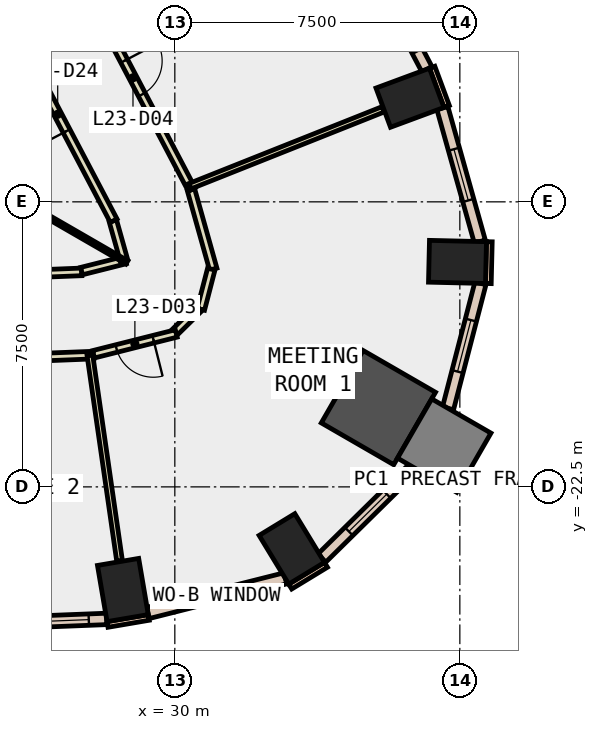
"""IFC4 building model, lengths in metres.
Left out: names, types, materials, properties, quantities, classifications, styles, units other than length and angle.
Written with IfcOpenShell. Run it as: python <this file> out.ifc"""

import sys

from ifc_helpers import new_model, si_unit, direction, frame, frame_2d, origin, origin_2d, place, context, subcontext, project, spatial, rectangle, extrude, element, fill, save


model = new_model("IFC4")
c1 = context("Model", 3, precision=1e-05, world=origin(), true_north=direction((0.0, 1.0)))
c2 = subcontext(c1, "Body", "Model", "MODEL_VIEW")
j1 = project(units=[si_unit("LENGTHUNIT", "METRE"), si_unit("PLANEANGLEUNIT", "RADIAN")], contexts=[c1])
p1 = place(None, origin())
s1 = spatial("IfcSite", under=j1, at=p1, CompositionType="ELEMENT")
p2 = place(p1, origin())
s2 = spatial("IfcBuilding", under=s1, at=p2, CompositionType="ELEMENT")
p3 = place(p2, frame((0.0, 0.0, 107.6)))
s3 = spatial("IfcBuildingStorey", under=s2, at=p3, CompositionType="ELEMENT", Elevation=107.6)
for number, where, z_axis, x_axis in (
    (1, (28.633, -25.214, -0.4), (0.0, 0.0, 1.0), (0.986, 0.168, 0.0)),
    (2, (33.078, -24.132, -0.4), (0.0, 0.0, 1.0), (0.854, 0.52, 0.0)),
):
    element("IfcColumn", number, at=place(p3, frame(where, z_axis=z_axis, x_axis=x_axis)), inside=s3, PredefinedType="COLUMN", context=c2, shape_type="SweptSolid", body=[
        extrude(rectangle(XDim=1.1, YDim=1.5, at=origin_2d()), origin(), (0.0, 0.0, 1.0), 4.2),
    ])
p4 = place(p3, frame((35.357, -20.414, -0.4), z_axis=(0.0, 0.0, 1.0), x_axis=(-0.866025403784, 0.5, 0.0)))
e3 = element("IfcColumn", 3, at=p4, inside=s3, PredefinedType="COLUMN", context=c2, shape_type="SweptSolid", body=[
    extrude(rectangle(XDim=2.2, YDim=2.2, at=origin_2d()), origin(), (0.0, 0.0, 1.0), 4.2),
])
for number, where, z_axis, x_axis in (
    (4, (37.438, -16.581, -0.4), (0.0, 0.0, 1.0), (0.023, 1.0, 0.0)),
    (5, (36.188, -12.261, -0.4), (0.0, 0.0, 1.0), (-0.347, 0.938, 0.0)),
):
    element("IfcColumn", number, at=place(p3, frame(where, z_axis=z_axis, x_axis=x_axis)), inside=s3, PredefinedType="COLUMN", context=c2, shape_type="SweptSolid", body=[
        extrude(rectangle(XDim=1.1, YDim=1.5, at=origin_2d()), origin(), (0.0, 0.0, 1.0), 4.2),
    ])
p5 = place(p3, frame((37.089, -21.414, -0.4), z_axis=(0.0, 0.0, 1.0), x_axis=(-0.866025403784, 0.5, 0.0)))
e6 = element("IfcColumn", 6, at=p5, inside=s3, PredefinedType="COLUMN", context=c2, shape_type="SweptSolid", body=[
    extrude(rectangle(XDim=1.8, YDim=1.8, at=origin_2d()), origin(), (0.0, 0.0, 1.0), 4.2),
])
p6 = place(p3, frame((37.153, -12.49, 0.0), z_axis=(0.0, 0.0, 1.0), x_axis=(-0.347205967468, 0.937788897436, 0.0)))
e7 = element("IfcWall", 7, at=p6, inside=s3, PredefinedType="STANDARD", context=c2, shape_type="SweptSolid", body=[
    extrude(rectangle(XDim=1.1, YDim=0.15, at=frame_2d((0.55, 0.0))), origin(), (0.0, 0.0, 1.0), 3.8),
])
p7 = place(p3, frame((28.229, -26.12, 0.0), z_axis=(0.0, 0.0, 1.0), x_axis=(0.985763338892, 0.168138751323, 0.0)))
e8 = element("IfcWall", 8, at=p7, inside=s3, PredefinedType="STANDARD", context=c2, shape_type="SweptSolid", body=[
    extrude(rectangle(XDim=1.101, YDim=0.15, at=frame_2d((0.55, 0.0))), origin(), (0.0, 0.0, 1.0), 3.8),
])
p8 = place(p3, frame((33.037, -25.123, 0.0), z_axis=(0.0, 0.0, 1.0), x_axis=(0.854245682901, 0.519869515594, 0.0)))
e9 = element("IfcWall", 9, at=p8, inside=s3, PredefinedType="STANDARD", context=c2, shape_type="SweptSolid", body=[
    extrude(rectangle(XDim=1.1, YDim=0.15, at=frame_2d((0.55, 0.0))), origin(), (0.0, 0.0, 1.0), 3.8),
])
p9 = place(p3, frame((38.25, -17.15, 0.0), z_axis=(0.0, 0.0, 1.0), x_axis=(0.023522901136, 0.999723298279, 0.0)))
e10 = element("IfcWall", 10, at=p9, inside=s3, PredefinedType="STANDARD", context=c2, shape_type="SweptSolid", body=[
    extrude(rectangle(XDim=1.1, YDim=0.15, at=frame_2d((0.55, 0.0))), origin(), (0.0, 0.0, 1.0), 3.8),
])
p10 = place(p3, frame((22.332, -26.206, 0.0), z_axis=(0.0, 0.0, 1.0), x_axis=(0.99922113396, 0.039460428885, 0.0)))
e11 = element("IfcWall", 11, at=p10, inside=s3, PredefinedType="STANDARD", context=c2, shape_type="SweptSolid", body=[
    extrude(rectangle(XDim=5.878, YDim=0.3, at=frame_2d((2.939, 0.0))), origin(), (0.0, 0.0, 1.0), 3.8),
])
p11 = place(p10, frame((0.469, 0.0, 0.9)))
e12 = element("IfcOpeningElement", 12, at=p11, cuts=e11, PredefinedType="OPENING", context=c2, shape_type="SweptSolid", body=[
    extrude(rectangle(XDim=2.0, YDim=2.6, at=frame_2d((1.0, 1.3))), frame((0.0, 0.16, 0.0), z_axis=(0.0, -1.0, 0.0), x_axis=(1.0, 0.0, 0.0)), (0.0, 0.0, 1.0), 0.32),
])
p12 = place(p10, frame((3.408, 0.0, 0.9)))
e13 = element("IfcOpeningElement", 13, at=p12, cuts=e11, PredefinedType="OPENING", context=c2, shape_type="SweptSolid", body=[
    extrude(rectangle(XDim=2.0, YDim=2.6, at=frame_2d((1.0, 1.3))), frame((0.0, 0.16, 0.0), z_axis=(0.0, -1.0, 0.0), x_axis=(1.0, 0.0, 0.0)), (0.0, 0.0, 1.0), 0.32),
])
p13 = place(p3, frame((29.293, -25.818, 0.0), z_axis=(0.0, 0.0, 1.0), x_axis=(0.969658938481, 0.244461741432, 0.0)))
e14 = element("IfcWall", 14, at=p13, inside=s3, PredefinedType="STANDARD", context=c2, shape_type="SweptSolid", body=[
    extrude(rectangle(XDim=3.727, YDim=0.3, at=frame_2d((1.864, 0.0))), origin(), (0.0, 0.0, 1.0), 3.8),
])
p14 = place(p13, frame((1.164, 0.0, 0.9)))
e15 = element("IfcOpeningElement", 15, at=p14, cuts=e14, PredefinedType="OPENING", context=c2, shape_type="SweptSolid", body=[
    extrude(rectangle(XDim=1.4, YDim=2.6, at=frame_2d((0.7, 1.3))), frame((0.0, 0.16, 0.0), z_axis=(0.0, -1.0, 0.0), x_axis=(1.0, 0.0, 0.0)), (0.0, 0.0, 1.0), 0.32),
])
p15 = place(p3, frame((33.868, -24.374, 0.0), z_axis=(0.0, 0.0, 1.0), x_axis=(0.712546371703, 0.701625019631, 0.0)))
e16 = element("IfcWall", 16, at=p15, inside=s3, PredefinedType="STANDARD", context=c2, shape_type="SweptSolid", body=[
    extrude(rectangle(XDim=3.398, YDim=0.3, at=frame_2d((1.699, 0.0))), origin(), (0.0, 0.0, 1.0), 3.8),
])
p16 = place(p15, frame((0.999, 0.0, 0.9)))
e17 = element("IfcOpeningElement", 17, at=p16, cuts=e16, PredefinedType="OPENING", context=c2, shape_type="SweptSolid", body=[
    extrude(rectangle(XDim=1.4, YDim=2.6, at=frame_2d((0.7, 1.3))), frame((0.0, 0.16, 0.0), z_axis=(0.0, -1.0, 0.0), x_axis=(1.0, 0.0, 0.0)), (0.0, 0.0, 1.0), 0.32),
])
p17 = place(p3, frame((37.189, -20.433, 0.0), z_axis=(0.0, 0.0, 1.0), x_axis=(0.251046938153, 0.967974914367, 0.0)))
e18 = element("IfcWall", 18, at=p17, inside=s3, PredefinedType="STANDARD", context=c2, shape_type="SweptSolid", body=[
    extrude(rectangle(XDim=3.398, YDim=0.3, at=frame_2d((1.699, 0.0))), origin(), (0.0, 0.0, 1.0), 3.8),
])
p18 = place(p17, frame((0.999, 0.0, 0.9)))
e19 = element("IfcOpeningElement", 19, at=p18, cuts=e18, PredefinedType="OPENING", context=c2, shape_type="SweptSolid", body=[
    extrude(rectangle(XDim=1.4, YDim=2.6, at=frame_2d((0.7, 1.3))), frame((0.0, 0.16, 0.0), z_axis=(0.0, -1.0, 0.0), x_axis=(1.0, 0.0, 0.0)), (0.0, 0.0, 1.0), 0.32),
])
p19 = place(p3, frame((38.026, -16.046, 0.0), z_axis=(0.0, 0.0, 1.0), x_axis=(-0.270054089595, 0.96284515302, 0.0)))
e20 = element("IfcWall", 20, at=p19, inside=s3, PredefinedType="STANDARD", context=c2, shape_type="SweptSolid", body=[
    extrude(rectangle(XDim=3.651, YDim=0.3, at=frame_2d((1.825, 0.0))), origin(), (0.0, 0.0, 1.0), 3.8),
])
p20 = place(p19, frame((1.125, 0.0, 0.9)))
e21 = element("IfcOpeningElement", 21, at=p20, cuts=e20, PredefinedType="OPENING", context=c2, shape_type="SweptSolid", body=[
    extrude(rectangle(XDim=1.4, YDim=2.6, at=frame_2d((0.7, 1.3))), frame((0.0, 0.16, 0.0), z_axis=(0.0, -1.0, 0.0), x_axis=(1.0, 0.0, 0.0)), (0.0, 0.0, 1.0), 0.32),
])
p21 = place(p3, frame((36.633, -11.511, 0.0), z_axis=(0.0, 0.0, 1.0), x_axis=(-0.465380908665, 0.88511050714, 0.0)))
e22 = element("IfcWall", 22, at=p21, inside=s3, PredefinedType="STANDARD", context=c2, shape_type="SweptSolid", body=[
    extrude(rectangle(XDim=6.139, YDim=0.3, at=frame_2d((3.07, 0.0))), origin(), (0.0, 0.0, 1.0), 3.8),
])
p22 = place(p21, frame((0.535, 0.0, 0.9)))
e23 = element("IfcOpeningElement", 23, at=p22, cuts=e22, PredefinedType="OPENING", context=c2, shape_type="SweptSolid", body=[
    extrude(rectangle(XDim=2.0, YDim=2.6, at=frame_2d((1.0, 1.3))), frame((0.0, 0.16, 0.0), z_axis=(0.0, -1.0, 0.0), x_axis=(1.0, 0.0, 0.0)), (0.0, 0.0, 1.0), 0.32),
])
p23 = place(p21, frame((3.604, 0.0, 0.9)))
e24 = element("IfcOpeningElement", 24, at=p23, cuts=e22, PredefinedType="OPENING", context=c2, shape_type="SweptSolid", body=[
    extrude(rectangle(XDim=2.0, YDim=2.6, at=frame_2d((1.0, 1.3))), frame((0.0, 0.16, 0.0), z_axis=(0.0, -1.0, 0.0), x_axis=(1.0, 0.0, 0.0)), (0.0, 0.0, 1.0), 0.32),
])
p24 = place(p3, frame((21.471, -17.083, 0.0), z_axis=(0.0, 0.0, 1.0), x_axis=(0.999221407079, 0.039453512338, 0.0)))
e25 = element("IfcWall", 25, at=p24, inside=s3, PredefinedType="PARTITIONING", context=c2, shape_type="SweptSolid", body=[
    extrude(rectangle(XDim=6.083, YDim=0.2, at=frame_2d((3.042, 0.0))), origin(), (0.0, 0.0, 1.0), 3.8),
])
p25 = place(p24, frame((2.541, 0.0, 0.0)))
e26 = element("IfcOpeningElement", 26, at=p25, cuts=e25, PredefinedType="OPENING", context=c2, shape_type="SweptSolid", body=[
    extrude(rectangle(XDim=1.0, YDim=2.1, at=frame_2d((0.5, 1.05))), frame((0.0, 0.11, 0.0), z_axis=(0.0, -1.0, 0.0), x_axis=(1.0, 0.0, 0.0)), (0.0, 0.0, 1.0), 0.22),
])
p26 = place(p3, frame((27.546, -16.822, 0.0), z_axis=(0.0, 0.0, 1.0), x_axis=(0.969694756333, 0.244319625777, 0.0)))
e27 = element("IfcWall", 27, at=p26, inside=s3, PredefinedType="PARTITIONING", context=c2, shape_type="SweptSolid", body=[
    extrude(rectangle(XDim=1.191, YDim=0.2, at=frame_2d((0.596, 0.0))), origin(), (0.0, 0.0, 1.0), 3.8),
])
p27 = place(p3, frame((28.662, -16.541, 0.0), z_axis=(0.0, 0.0, 1.0), x_axis=(-0.270771802087, 0.96264356394, 0.0)))
e28 = element("IfcWall", 28, at=p27, inside=s3, PredefinedType="PARTITIONING", context=c2, shape_type="SweptSolid", body=[
    extrude(rectangle(XDim=1.078, YDim=0.2, at=frame_2d((0.539, 0.0))), origin(), (0.0, 0.0, 1.0), 3.8),
])
p28 = place(p3, frame((28.39, -15.495, 0.0), z_axis=(0.0, 0.0, 1.0), x_axis=(-0.465367816287, 0.885117390838, 0.0)))
e29 = element("IfcWall", 29, at=p28, inside=s3, PredefinedType="PARTITIONING", context=c2, shape_type="SweptSolid", body=[
    extrude(rectangle(XDim=6.326, YDim=0.2, at=frame_2d((3.163, 0.0))), origin(), (0.0, 0.0, 1.0), 3.8),
])
p29 = place(p28, frame((2.663, 0.0, 0.0)))
e30 = element("IfcOpeningElement", 30, at=p29, cuts=e29, PredefinedType="OPENING", context=c2, shape_type="SweptSolid", body=[
    extrude(rectangle(XDim=1.0, YDim=2.1, at=frame_2d((0.5, 1.05))), frame((0.0, 0.11, 0.0), z_axis=(0.0, -1.0, 0.0), x_axis=(1.0, 0.0, 0.0)), (0.0, 0.0, 1.0), 0.22),
])
p30 = place(p3, frame((27.865, -19.032, 0.0), z_axis=(0.0, 0.0, 1.0), x_axis=(-0.999218029978, -0.039538950003, 0.0)))
e31 = element("IfcWall", 31, at=p30, inside=s3, PredefinedType="PARTITIONING", context=c2, shape_type="SweptSolid", body=[
    extrude(rectangle(XDim=6.249, YDim=0.2, at=frame_2d((3.125, 0.0))), origin(), (0.0, 0.0, 1.0), 3.8),
])
p31 = place(p30, frame((2.699, 0.0, 0.0)))
e32 = element("IfcOpeningElement", 32, at=p31, cuts=e31, PredefinedType="OPENING", context=c2, shape_type="SweptSolid", body=[
    extrude(rectangle(XDim=1.0, YDim=2.1, at=frame_2d((0.5, 1.05))), frame((0.0, 0.11, 0.0), z_axis=(0.0, -1.0, 0.0), x_axis=(1.0, 0.0, 0.0)), (0.0, 0.0, 1.0), 0.22),
])
p32 = place(p3, frame((30.426, -14.685, 0.0), z_axis=(0.0, 0.0, 1.0), x_axis=(0.270131711391, -0.962823378664, 0.0)))
e33 = element("IfcWall", 33, at=p32, inside=s3, PredefinedType="PARTITIONING", context=c2, shape_type="SweptSolid", body=[
    extrude(rectangle(XDim=2.166, YDim=0.2, at=frame_2d((1.083, 0.0))), origin(), (0.0, 0.0, 1.0), 3.8),
])
p33 = place(p3, frame((30.959, -16.771, 0.0), z_axis=(0.0, 0.0, 1.0), x_axis=(-0.251109729392, -0.967958627114, 0.0)))
e34 = element("IfcWall", 34, at=p33, inside=s3, PredefinedType="PARTITIONING", context=c2, shape_type="SweptSolid", body=[
    extrude(rectangle(XDim=1.091, YDim=0.2, at=frame_2d((0.545, 0.0))), origin(), (0.0, 0.0, 1.0), 3.8),
])
p34 = place(p3, frame((30.639, -17.801, 0.0), z_axis=(0.0, 0.0, 1.0), x_axis=(-0.713329122722, -0.700829196507, 0.0)))
e35 = element("IfcWall", 35, at=p34, inside=s3, PredefinedType="PARTITIONING", context=c2, shape_type="SweptSolid", body=[
    extrude(rectangle(XDim=0.879, YDim=0.2, at=frame_2d((0.439, 0.0))), origin(), (0.0, 0.0, 1.0), 3.8),
])
p35 = place(p3, frame((30.037, -18.463, 0.0), z_axis=(0.0, 0.0, 1.0), x_axis=(-0.969686214682, -0.244353524746, 0.0)))
e36 = element("IfcWall", 36, at=p35, inside=s3, PredefinedType="PARTITIONING", context=c2, shape_type="SweptSolid", body=[
    extrude(rectangle(XDim=2.243, YDim=0.2, at=frame_2d((1.122, 0.0))), origin(), (0.0, 0.0, 1.0), 3.8),
])
p36 = place(p35, frame((0.622, 0.0, 0.0)))
e37 = element("IfcOpeningElement", 37, at=p36, cuts=e36, PredefinedType="OPENING", context=c2, shape_type="SweptSolid", body=[
    extrude(rectangle(XDim=1.0, YDim=2.1, at=frame_2d((0.5, 1.05))), frame((0.0, 0.11, 0.0), z_axis=(0.0, -1.0, 0.0), x_axis=(1.0, 0.0, 0.0)), (0.0, 0.0, 1.0), 0.22),
])
p37 = place(p3, frame((27.353, -8.794, 0.0), z_axis=(0.0, 0.0, 1.0), x_axis=(0.465239168813, -0.885185017836, 0.0)))
e38 = element("IfcWall", 38, at=p37, inside=s3, PredefinedType="PARTITIONING", context=c2, shape_type="SweptSolid", body=[
    extrude(rectangle(XDim=6.646, YDim=0.2, at=frame_2d((3.323, 0.0))), origin(), (0.0, 0.0, 1.0), 3.8),
])
p38 = place(p37, frame((2.823, 0.0, 0.0)))
e39 = element("IfcOpeningElement", 39, at=p38, cuts=e38, PredefinedType="OPENING", context=c2, shape_type="SweptSolid", body=[
    extrude(rectangle(XDim=1.0, YDim=2.1, at=frame_2d((0.5, 1.05))), frame((0.0, 0.11, 0.0), z_axis=(0.0, -1.0, 0.0), x_axis=(1.0, 0.0, 0.0)), (0.0, 0.0, 1.0), 0.22),
])
p39 = place(p3, frame((21.196, -12.238, 0.0), z_axis=(0.0, 0.0, 1.0), x_axis=(0.866023145199, -0.500003911965, 0.0)))
e40 = element("IfcWall", 40, at=p39, inside=s3, PredefinedType="PARTITIONING", context=c2, shape_type="SweptSolid", body=[
    extrude(rectangle(XDim=8.71, YDim=0.1, at=frame_2d((4.355, 0.0))), origin(), (0.0, 0.0, 1.0), 3.8),
])
p40 = place(p3, frame((27.765, -19.036, 0.0), z_axis=(0.0, 0.0, 1.0), x_axis=(0.142827612329, -0.989747580526, 0.0)))
e41 = element("IfcWall", 41, at=p40, inside=s3, PredefinedType="PARTITIONING", context=c2, shape_type="SweptSolid", body=[
    extrude(rectangle(XDim=5.468, YDim=0.15, at=frame_2d((2.734, 0.0))), origin(), (0.0, 0.0, 1.0), 3.8),
])
p41 = place(p3, frame((30.399, -14.588, 0.0), z_axis=(0.0, 0.0, 1.0), x_axis=(0.92913411584, 0.36974287658, 0.0)))
e42 = element("IfcWall", 42, at=p41, inside=s3, PredefinedType="PARTITIONING", context=c2, shape_type="SweptSolid", body=[
    extrude(rectangle(XDim=5.469, YDim=0.15, at=frame_2d((2.734, 0.0))), origin(), (0.0, 0.0, 1.0), 3.8),
])
p42 = place(p12, origin())
e43 = element("IfcWindow", 43, at=p42, inside=s3, PartitioningType="SINGLE_PANEL", PredefinedType="WINDOW", context=c2, shape_type="SweptSolid", body=[
    extrude(rectangle(XDim=2.0, YDim=2.6, at=frame_2d((1.0, 1.3))), frame((0.0, 0.03, 0.0), z_axis=(0.0, -1.0, 0.0), x_axis=(1.0, 0.0, 0.0)), (0.0, 0.0, 1.0), 0.06),
])
fill(e13, e43)
p43 = place(p14, origin())
e44 = element("IfcWindow", 44, at=p43, inside=s3, PartitioningType="SINGLE_PANEL", PredefinedType="WINDOW", context=c2, shape_type="SweptSolid", body=[
    extrude(rectangle(XDim=1.4, YDim=2.6, at=frame_2d((0.7, 1.3))), frame((0.0, 0.03, 0.0), z_axis=(0.0, -1.0, 0.0), x_axis=(1.0, 0.0, 0.0)), (0.0, 0.0, 1.0), 0.06),
])
fill(e15, e44)
p44 = place(p16, origin())
e45 = element("IfcWindow", 45, at=p44, inside=s3, PartitioningType="SINGLE_PANEL", PredefinedType="WINDOW", context=c2, shape_type="SweptSolid", body=[
    extrude(rectangle(XDim=1.4, YDim=2.6, at=frame_2d((0.7, 1.3))), frame((0.0, 0.03, 0.0), z_axis=(0.0, -1.0, 0.0), x_axis=(1.0, 0.0, 0.0)), (0.0, 0.0, 1.0), 0.06),
])
fill(e17, e45)
p45 = place(p18, origin())
e46 = element("IfcWindow", 46, at=p45, inside=s3, PartitioningType="SINGLE_PANEL", PredefinedType="WINDOW", context=c2, shape_type="SweptSolid", body=[
    extrude(rectangle(XDim=1.4, YDim=2.6, at=frame_2d((0.7, 1.3))), frame((0.0, 0.03, 0.0), z_axis=(0.0, -1.0, 0.0), x_axis=(1.0, 0.0, 0.0)), (0.0, 0.0, 1.0), 0.06),
])
fill(e19, e46)
p46 = place(p20, origin())
e47 = element("IfcWindow", 47, at=p46, inside=s3, PartitioningType="SINGLE_PANEL", PredefinedType="WINDOW", context=c2, shape_type="SweptSolid", body=[
    extrude(rectangle(XDim=1.4, YDim=2.6, at=frame_2d((0.7, 1.3))), frame((0.0, 0.03, 0.0), z_axis=(0.0, -1.0, 0.0), x_axis=(1.0, 0.0, 0.0)), (0.0, 0.0, 1.0), 0.06),
])
fill(e21, e47)
p47 = place(p36, origin())
e48 = element("IfcDoor", 48, at=p47, inside=s3, OperationType="SINGLE_SWING_LEFT", PredefinedType="DOOR", context=c2, shape_type="SweptSolid", body=[
    extrude(rectangle(XDim=1.0, YDim=2.1, at=frame_2d((0.5, 1.05))), frame((0.0, 0.025, 0.0), z_axis=(0.0, -1.0, 0.0), x_axis=(1.0, 0.0, 0.0)), (0.0, 0.0, 1.0), 0.05),
])
fill(e37, e48)
p48 = place(p38, origin())
e49 = element("IfcDoor", 49, at=p48, inside=s3, OperationType="SINGLE_SWING_LEFT", PredefinedType="DOOR", context=c2, shape_type="SweptSolid", body=[
    extrude(rectangle(XDim=1.0, YDim=2.1, at=frame_2d((0.5, 1.05))), frame((0.0, 0.025, 0.0), z_axis=(0.0, -1.0, 0.0), x_axis=(1.0, 0.0, 0.0)), (0.0, 0.0, 1.0), 0.05),
])
fill(e39, e49)
p49 = place(p29, origin())
e50 = element("IfcDoor", 50, at=p49, inside=s3, OperationType="SINGLE_SWING_LEFT", PredefinedType="DOOR", context=c2, shape_type="SweptSolid", body=[
    extrude(rectangle(XDim=1.0, YDim=2.1, at=frame_2d((0.5, 1.05))), frame((0.0, 0.025, 0.0), z_axis=(0.0, -1.0, 0.0), x_axis=(1.0, 0.0, 0.0)), (0.0, 0.0, 1.0), 0.05),
])
fill(e30, e50)
save(model, sys.argv[1])
